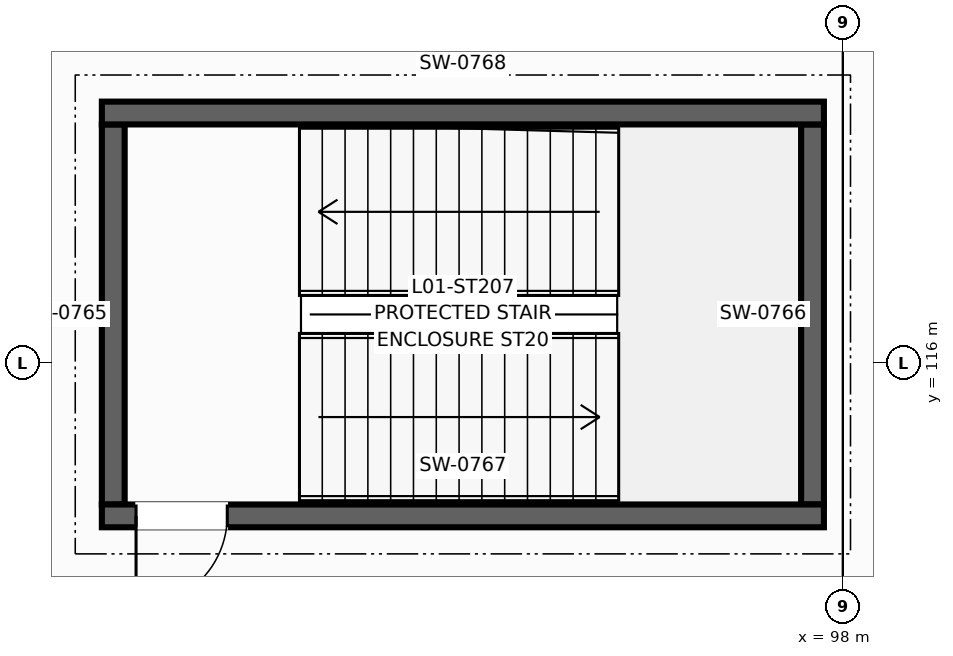
"""IFC4 building model, lengths in metres.
Left out: names, types, materials, properties, quantities, classifications, styles, units other than length and angle.
Written with IfcOpenShell. Run it as: python <this file> out.ifc"""

import sys

from ifc_helpers import new_model, si_unit, direction, frame, frame_2d, origin, place, context, subcontext, project, spatial, rectangle, extrude, element, fill, save


model = new_model("IFC4")
c1 = context("Model", 3, precision=1e-05, world=origin(), true_north=direction((0.0, 1.0)))
c2 = subcontext(c1, "Body", "Model", "MODEL_VIEW")
j1 = project(units=[si_unit("LENGTHUNIT", "METRE"), si_unit("PLANEANGLEUNIT", "RADIAN")], contexts=[c1])
p1 = place(None, origin())
s1 = spatial("IfcSite", under=j1, at=p1, CompositionType="ELEMENT")
p2 = place(p1, origin())
s2 = spatial("IfcBuilding", under=s1, at=p2, CompositionType="ELEMENT")
p3 = place(p2, frame((0.0, 0.0, 4.5)))
s3 = spatial("IfcBuildingStorey", under=s2, at=p3, CompositionType="ELEMENT", Elevation=4.5)
for number, where, z_axis, x_axis in (
    (1, (88.4, 114.14, 0.0), (0.0, 0.0, 1.0), (0.0, 1.0, 0.0)),
    (2, (97.6, 114.14, 0.0), (0.0, 0.0, 1.0), (0.0, 1.0, 0.0)),
):
    element("IfcWall", number, at=place(p3, frame(where, z_axis=z_axis, x_axis=x_axis)), inside=s3, PredefinedType="SHEAR", context=c2, shape_type="SweptSolid", body=[
        extrude(rectangle(XDim=5.0, YDim=0.3, at=frame_2d((2.5, 0.0))), origin(), (0.0, 0.0, 1.0), 4.25),
    ])
p4 = place(p3, frame((88.25, 113.99, 0.0), z_axis=(0.0, 0.0, 1.0), x_axis=(1.0, 0.0, 0.0)))
e3 = element("IfcWall", 3, at=p4, inside=s3, PredefinedType="SHEAR", context=c2, shape_type="SweptSolid", body=[
    extrude(rectangle(XDim=9.5, YDim=0.3, at=frame_2d((4.75, 0.0))), origin(), (0.0, 0.0, 1.0), 4.25),
])
p5 = place(p4, frame((0.45, 0.0, 0.0)))
e4 = element("IfcOpeningElement", 4, at=p5, cuts=e3, PredefinedType="OPENING", context=c2, shape_type="SweptSolid", body=[
    extrude(rectangle(XDim=1.2, YDim=2.2, at=frame_2d((0.6, 1.1))), frame((0.0, 0.16, 0.0), z_axis=(0.0, -1.0, 0.0), x_axis=(1.0, 0.0, 0.0)), (0.0, 0.0, 1.0), 0.32),
])
p6 = place(p3, frame((88.25, 119.29, 0.0), z_axis=(0.0, 0.0, 1.0), x_axis=(1.0, 0.0, 0.0)))
e5 = element("IfcWall", 5, at=p6, inside=s3, PredefinedType="SHEAR", context=c2, shape_type="SweptSolid", body=[
    extrude(rectangle(XDim=9.5, YDim=0.3, at=frame_2d((4.75, 0.0))), origin(), (0.0, 0.0, 1.0), 4.25),
])
p7 = place(p5, frame((1.2, 0.0, 0.0), z_axis=(0.0, 0.0, 1.0), x_axis=(-1.0, 0.0, 0.0)))
e6 = element("IfcDoor", 6, at=p7, inside=s3, OperationType="SINGLE_SWING_LEFT", PredefinedType="DOOR", context=c2, shape_type="SweptSolid", body=[
    extrude(rectangle(XDim=1.2, YDim=2.2, at=frame_2d((0.6, 1.1))), frame((0.0, 0.025, 0.0), z_axis=(0.0, -1.0, 0.0), x_axis=(1.0, 0.0, 0.0)), (0.0, 0.0, 1.0), 0.05),
])
fill(e4, e6)
save(model, sys.argv[1])
